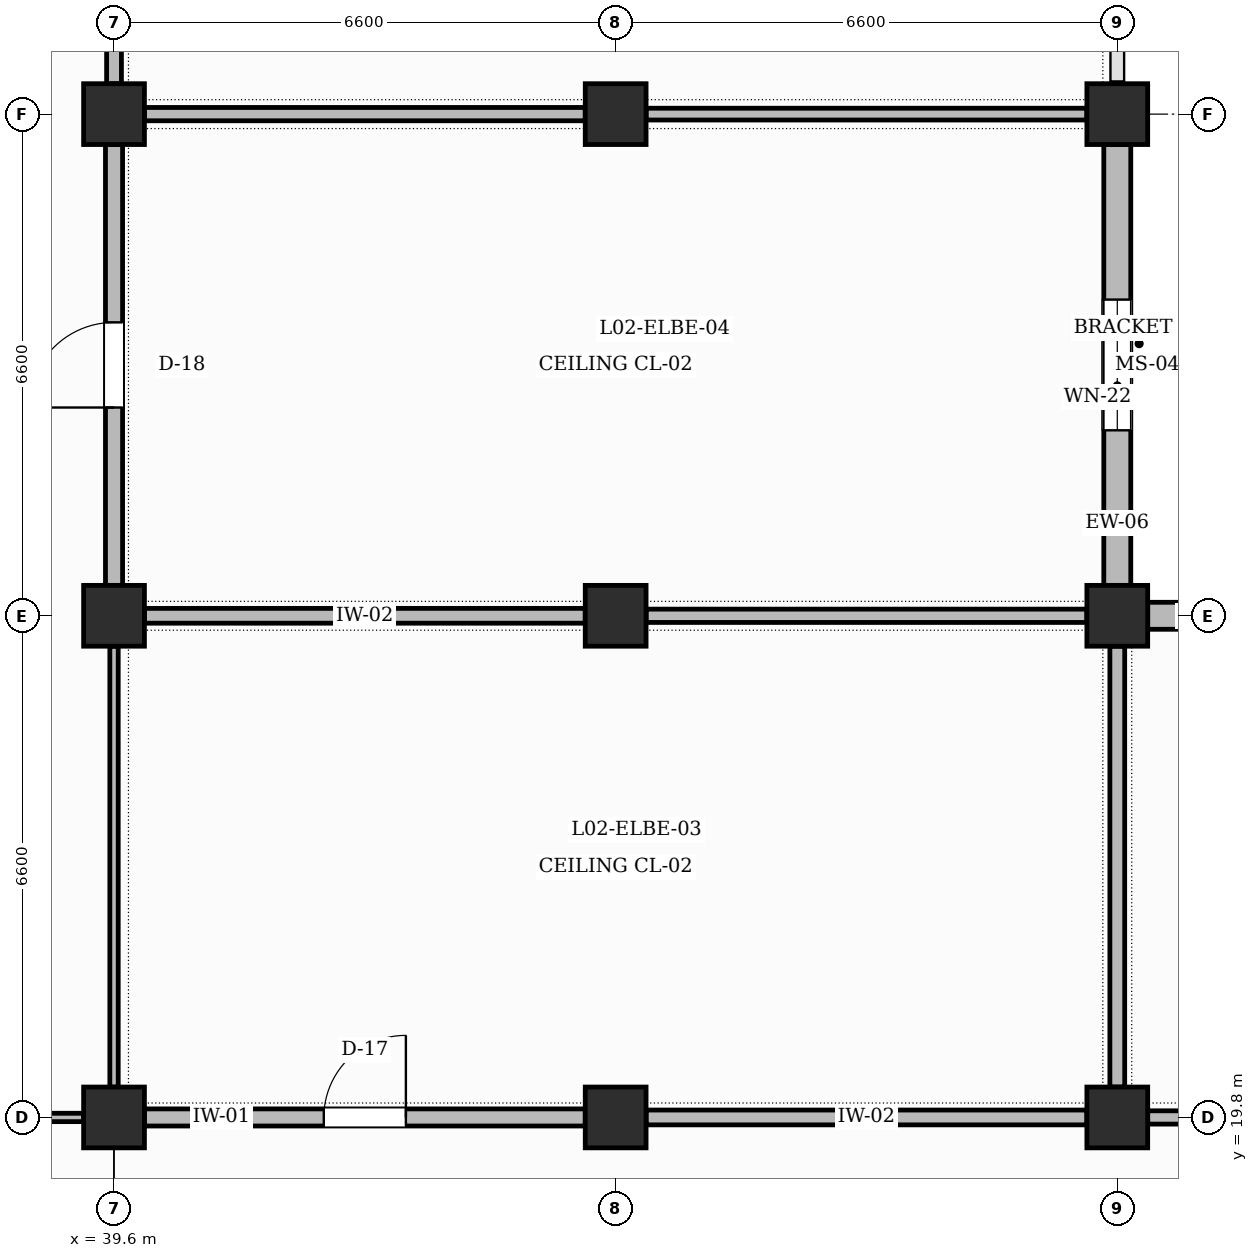
"""IFC4 building model, lengths in metres.
Left out: names, types, materials, properties, quantities, classifications, styles, units other than length and angle.
Written with IfcOpenShell. Run it as: python <this file> out.ifc"""

import sys

from ifc_helpers import new_model, si_unit, direction, frame, frame_2d, origin, origin_2d, place, context, subcontext, project, spatial, rectangle, extrude, element, fill, save


model = new_model("IFC4")
c1 = context("Model", 3, precision=1e-05, world=origin(), true_north=direction((0.0, 1.0)))
c2 = subcontext(c1, "Body", "Model", "MODEL_VIEW")
j1 = project(units=[si_unit("LENGTHUNIT", "METRE"), si_unit("PLANEANGLEUNIT", "RADIAN")], contexts=[c1])
p1 = place(None, origin())
s1 = spatial("IfcSite", under=j1, at=p1, CompositionType="ELEMENT")
p2 = place(p1, origin())
s2 = spatial("IfcBuilding", under=s1, at=p2, CompositionType="ELEMENT")
p3 = place(p2, frame((0.0, 0.0, 10.2)))
s3 = spatial("IfcBuildingStorey", under=s2, at=p3, CompositionType="ELEMENT", Elevation=10.2)
for number, where, z_axis, x_axis in (
    (1, (39.6, 19.8, 0.0), (0.0, 0.0, 1.0), (1.0, 0.0, 0.0)),
    (2, (39.6, 26.4, 0.0), (0.0, 0.0, 1.0), (1.0, 0.0, 0.0)),
    (3, (39.6, 33.0, 0.0), (0.0, 0.0, 1.0), (1.0, 0.0, 0.0)),
    (4, (46.2, 19.8, 0.0), (0.0, 0.0, 1.0), (1.0, 0.0, 0.0)),
    (5, (46.2, 26.4, 0.0), (0.0, 0.0, 1.0), (1.0, 0.0, 0.0)),
    (6, (46.2, 33.0, 0.0), (0.0, 0.0, 1.0), (1.0, 0.0, 0.0)),
    (7, (52.8, 19.8, 0.0), (0.0, 0.0, 1.0), (1.0, 0.0, 0.0)),
    (8, (52.8, 26.4, 0.0), (0.0, 0.0, 1.0), (1.0, 0.0, 0.0)),
    (9, (52.8, 33.0, 0.0), (0.0, 0.0, 1.0), (1.0, 0.0, 0.0)),
):
    element("IfcColumn", number, at=place(p3, frame(where, z_axis=z_axis, x_axis=x_axis)), inside=s3, PredefinedType="COLUMN", context=c2, shape_type="SweptSolid", body=[
        extrude(rectangle(XDim=0.8, YDim=0.8, at=origin_2d()), origin(), (0.0, 0.0, 1.0), 4.2),
    ])
p4 = place(p3, frame((52.8, 26.8, 0.0), z_axis=(0.0, 0.0, 1.0), x_axis=(0.0, 1.0, 0.0)))
e10 = element("IfcWall", 10, at=p4, inside=s3, PredefinedType="SOLIDWALL", context=c2, shape_type="SweptSolid", body=[
    extrude(rectangle(XDim=5.8, YDim=0.355, at=frame_2d((2.9, 0.0))), origin(), (0.0, 0.0, 1.0), 3.25),
])
p5 = place(p4, frame((2.04, 0.0, 0.95)))
e11 = element("IfcOpeningElement", 11, at=p5, cuts=e10, PredefinedType="OPENING", context=c2, shape_type="SweptSolid", body=[
    extrude(rectangle(XDim=1.72, YDim=1.52, at=frame_2d((0.86, 0.76))), frame((0.0, 0.188, 0.0), z_axis=(0.0, -1.0, 0.0), x_axis=(1.0, 0.0, 0.0)), (0.0, 0.0, 1.0), 0.375),
])
p6 = place(p3, frame((53.2, 26.4, 0.0), z_axis=(0.0, 0.0, 1.0), x_axis=(1.0, 0.0, 0.0)))
e12 = element("IfcWall", 12, at=p6, inside=s3, PredefinedType="SOLIDWALL", context=c2, shape_type="SweptSolid", body=[
    extrude(rectangle(XDim=5.8, YDim=0.355, at=frame_2d((2.9, 0.0))), origin(), (0.0, 0.0, 1.0), 3.25),
])
p7 = place(p6, frame((2.04, 0.0, 0.95)))
e13 = element("IfcOpeningElement", 13, at=p7, cuts=e12, PredefinedType="OPENING", context=c2, shape_type="SweptSolid", body=[
    extrude(rectangle(XDim=1.72, YDim=1.96, at=frame_2d((0.86, 0.98))), frame((0.0, 0.188, 0.0), z_axis=(0.0, -1.0, 0.0), x_axis=(1.0, 0.0, 0.0)), (0.0, 0.0, 1.0), 0.375),
])
p8 = place(p3, frame((33.425, 19.8, 0.0), z_axis=(0.0, 0.0, 1.0), x_axis=(1.0, 0.0, 0.0)))
e14 = element("IfcWall", 14, at=p8, inside=s3, PredefinedType="PARTITIONING", context=c2, shape_type="SweptSolid", body=[
    extrude(rectangle(XDim=5.775, YDim=0.11, at=frame_2d((2.887, 0.0))), origin(), (0.0, 0.0, 1.0), 3.0),
])
p9 = place(p8, frame((1.975, 0.0, 0.0)))
e15 = element("IfcOpeningElement", 15, at=p9, cuts=e14, PredefinedType="OPENING", context=c2, shape_type="SweptSolid", body=[
    extrude(rectangle(XDim=1.8, YDim=2.3, at=frame_2d((0.9, 1.15))), frame((0.0, 0.065, 0.0), z_axis=(0.0, -1.0, 0.0), x_axis=(1.0, 0.0, 0.0)), (0.0, 0.0, 1.0), 0.13),
])
p10 = place(p3, frame((39.6, 20.2, 0.0), z_axis=(0.0, 0.0, 1.0), x_axis=(0.0, 1.0, 0.0)))
e16 = element("IfcWall", 16, at=p10, inside=s3, PredefinedType="PARTITIONING", context=c2, shape_type="SweptSolid", body=[
    extrude(rectangle(XDim=5.8, YDim=0.11, at=frame_2d((2.9, 0.0))), origin(), (0.0, 0.0, 1.0), 3.1),
])
p11 = place(p3, frame((39.6, 26.8, 0.0), z_axis=(0.0, 0.0, 1.0), x_axis=(0.0, 1.0, 0.0)))
e17 = element("IfcWall", 17, at=p11, inside=s3, PredefinedType="PARTITIONING", context=c2, shape_type="SweptSolid", body=[
    extrude(rectangle(XDim=5.8, YDim=0.225, at=frame_2d((2.9, 0.0))), origin(), (0.0, 0.0, 1.0), 3.1),
])
p12 = place(p11, frame((2.34, 0.0, 0.0)))
e18 = element("IfcOpeningElement", 18, at=p12, cuts=e17, PredefinedType="OPENING", context=c2, shape_type="SweptSolid", body=[
    extrude(rectangle(XDim=1.12, YDim=2.2, at=frame_2d((0.56, 1.1))), frame((0.0, 0.123, 0.0), z_axis=(0.0, -1.0, 0.0), x_axis=(1.0, 0.0, 0.0)), (0.0, 0.0, 1.0), 0.245),
])
p13 = place(p3, frame((39.6, 33.4, 0.0), z_axis=(0.0, 0.0, 1.0), x_axis=(0.0, 1.0, 0.0)))
e19 = element("IfcWall", 19, at=p13, inside=s3, PredefinedType="PARTITIONING", context=c2, shape_type="SweptSolid", body=[
    extrude(rectangle(XDim=5.8, YDim=0.195, at=frame_2d((2.9, 0.0))), origin(), (0.0, 0.0, 1.0), 3.1),
])
p14 = place(p13, frame((2.31, 0.0, 0.0)))
e20 = element("IfcOpeningElement", 20, at=p14, cuts=e19, PredefinedType="OPENING", context=c2, shape_type="SweptSolid", body=[
    extrude(rectangle(XDim=1.18, YDim=2.2, at=frame_2d((0.59, 1.1))), frame((0.0, 0.107, 0.0), z_axis=(0.0, -1.0, 0.0), x_axis=(1.0, 0.0, 0.0)), (0.0, 0.0, 1.0), 0.215),
])
p15 = place(p3, frame((40.0, 19.8, 0.0), z_axis=(0.0, 0.0, 1.0), x_axis=(1.0, 0.0, 0.0)))
e21 = element("IfcWall", 21, at=p15, inside=s3, PredefinedType="PARTITIONING", context=c2, shape_type="SweptSolid", body=[
    extrude(rectangle(XDim=5.8, YDim=0.225, at=frame_2d((2.9, 0.0))), origin(), (0.0, 0.0, 1.0), 3.1),
])
p16 = place(p15, frame((2.36, 0.0, 0.0)))
e22 = element("IfcOpeningElement", 22, at=p16, cuts=e21, PredefinedType="OPENING", context=c2, shape_type="SweptSolid", body=[
    extrude(rectangle(XDim=1.08, YDim=2.15, at=frame_2d((0.54, 1.075))), frame((0.0, 0.123, 0.0), z_axis=(0.0, -1.0, 0.0), x_axis=(1.0, 0.0, 0.0)), (0.0, 0.0, 1.0), 0.245),
])
p17 = place(p3, frame((40.0, 26.4, 0.0), z_axis=(0.0, 0.0, 1.0), x_axis=(1.0, 0.0, 0.0)))
e23 = element("IfcWall", 23, at=p17, inside=s3, PredefinedType="PARTITIONING", context=c2, shape_type="SweptSolid", body=[
    extrude(rectangle(XDim=5.8, YDim=0.195, at=frame_2d((2.9, 0.0))), origin(), (0.0, 0.0, 1.0), 3.0),
])
p18 = place(p3, frame((40.0, 33.0, 0.0), z_axis=(0.0, 0.0, 1.0), x_axis=(1.0, 0.0, 0.0)))
e24 = element("IfcWall", 24, at=p18, inside=s3, PredefinedType="PARTITIONING", context=c2, shape_type="SweptSolid", body=[
    extrude(rectangle(XDim=5.8, YDim=0.175, at=frame_2d((2.9, 0.0))), origin(), (0.0, 0.0, 1.0), 3.1),
])
p19 = place(p3, frame((46.6, 19.8, 0.0), z_axis=(0.0, 0.0, 1.0), x_axis=(1.0, 0.0, 0.0)))
e25 = element("IfcWall", 25, at=p19, inside=s3, PredefinedType="PARTITIONING", context=c2, shape_type="SweptSolid", body=[
    extrude(rectangle(XDim=5.8, YDim=0.195, at=frame_2d((2.9, 0.0))), origin(), (0.0, 0.0, 1.0), 3.0),
])
p20 = place(p3, frame((52.8, 20.2, 0.0), z_axis=(0.0, 0.0, 1.0), x_axis=(0.0, 1.0, 0.0)))
e26 = element("IfcWall", 26, at=p20, inside=s3, PredefinedType="PARTITIONING", context=c2, shape_type="SweptSolid", body=[
    extrude(rectangle(XDim=5.8, YDim=0.195, at=frame_2d((2.9, 0.0))), origin(), (0.0, 0.0, 1.0), 3.1),
])
p21 = place(p3, frame((46.6, 26.4, 0.0), z_axis=(0.0, 0.0, 1.0), x_axis=(1.0, 0.0, 0.0)))
e27 = element("IfcWall", 27, at=p21, inside=s3, PredefinedType="PARTITIONING", context=c2, shape_type="SweptSolid", body=[
    extrude(rectangle(XDim=5.8, YDim=0.175, at=frame_2d((2.9, 0.0))), origin(), (0.0, 0.0, 1.0), 3.1),
])
p22 = place(p3, frame((46.6, 33.0, 0.0), z_axis=(0.0, 0.0, 1.0), x_axis=(1.0, 0.0, 0.0)))
e28 = element("IfcWall", 28, at=p22, inside=s3, PredefinedType="PARTITIONING", context=c2, shape_type="SweptSolid", body=[
    extrude(rectangle(XDim=5.8, YDim=0.155, at=frame_2d((2.9, 0.0))), origin(), (0.0, 0.0, 1.0), 3.0),
])
p23 = place(p3, frame((53.2, 19.8, 0.0), z_axis=(0.0, 0.0, 1.0), x_axis=(1.0, 0.0, 0.0)))
e29 = element("IfcWall", 29, at=p23, inside=s3, PredefinedType="PARTITIONING", context=c2, shape_type="SweptSolid", body=[
    extrude(rectangle(XDim=5.8, YDim=0.175, at=frame_2d((2.9, 0.0))), origin(), (0.0, 0.0, 1.0), 3.1),
])
p24 = place(p23, frame((2.34, 0.0, 0.0)))
e30 = element("IfcOpeningElement", 30, at=p24, cuts=e29, PredefinedType="OPENING", context=c2, shape_type="SweptSolid", body=[
    extrude(rectangle(XDim=1.12, YDim=2.2, at=frame_2d((0.56, 1.1))), frame((0.0, 0.097, 0.0), z_axis=(0.0, -1.0, 0.0), x_axis=(1.0, 0.0, 0.0)), (0.0, 0.0, 1.0), 0.195),
])
p25 = place(p5, origin())
e31 = element("IfcWindow", 31, at=p25, inside=s3, PartitioningType="DOUBLE_PANEL_VERTICAL", PredefinedType="WINDOW", context=c2, shape_type="SweptSolid", body=[
    extrude(rectangle(XDim=1.72, YDim=1.52, at=frame_2d((0.86, 0.76))), frame((0.0, 0.03, 0.0), z_axis=(0.0, -1.0, 0.0), x_axis=(1.0, 0.0, 0.0)), (0.0, 0.0, 1.0), 0.06),
])
fill(e11, e31)
p26 = place(p16, origin())
e32 = element("IfcDoor", 32, at=p26, inside=s3, OperationType="SINGLE_SWING_RIGHT", PredefinedType="DOOR", context=c2, shape_type="SweptSolid", body=[
    extrude(rectangle(XDim=1.08, YDim=2.15, at=frame_2d((0.54, 1.075))), frame((0.0, 0.025, 0.0), z_axis=(0.0, -1.0, 0.0), x_axis=(1.0, 0.0, 0.0)), (0.0, 0.0, 1.0), 0.05),
])
fill(e22, e32)
p27 = place(p12, origin())
e33 = element("IfcDoor", 33, at=p27, inside=s3, OperationType="SINGLE_SWING_LEFT", PredefinedType="DOOR", context=c2, shape_type="SweptSolid", body=[
    extrude(rectangle(XDim=1.12, YDim=2.2, at=frame_2d((0.56, 1.1))), frame((0.0, 0.025, 0.0), z_axis=(0.0, -1.0, 0.0), x_axis=(1.0, 0.0, 0.0)), (0.0, 0.0, 1.0), 0.05),
])
fill(e18, e33)
save(model, sys.argv[1])
